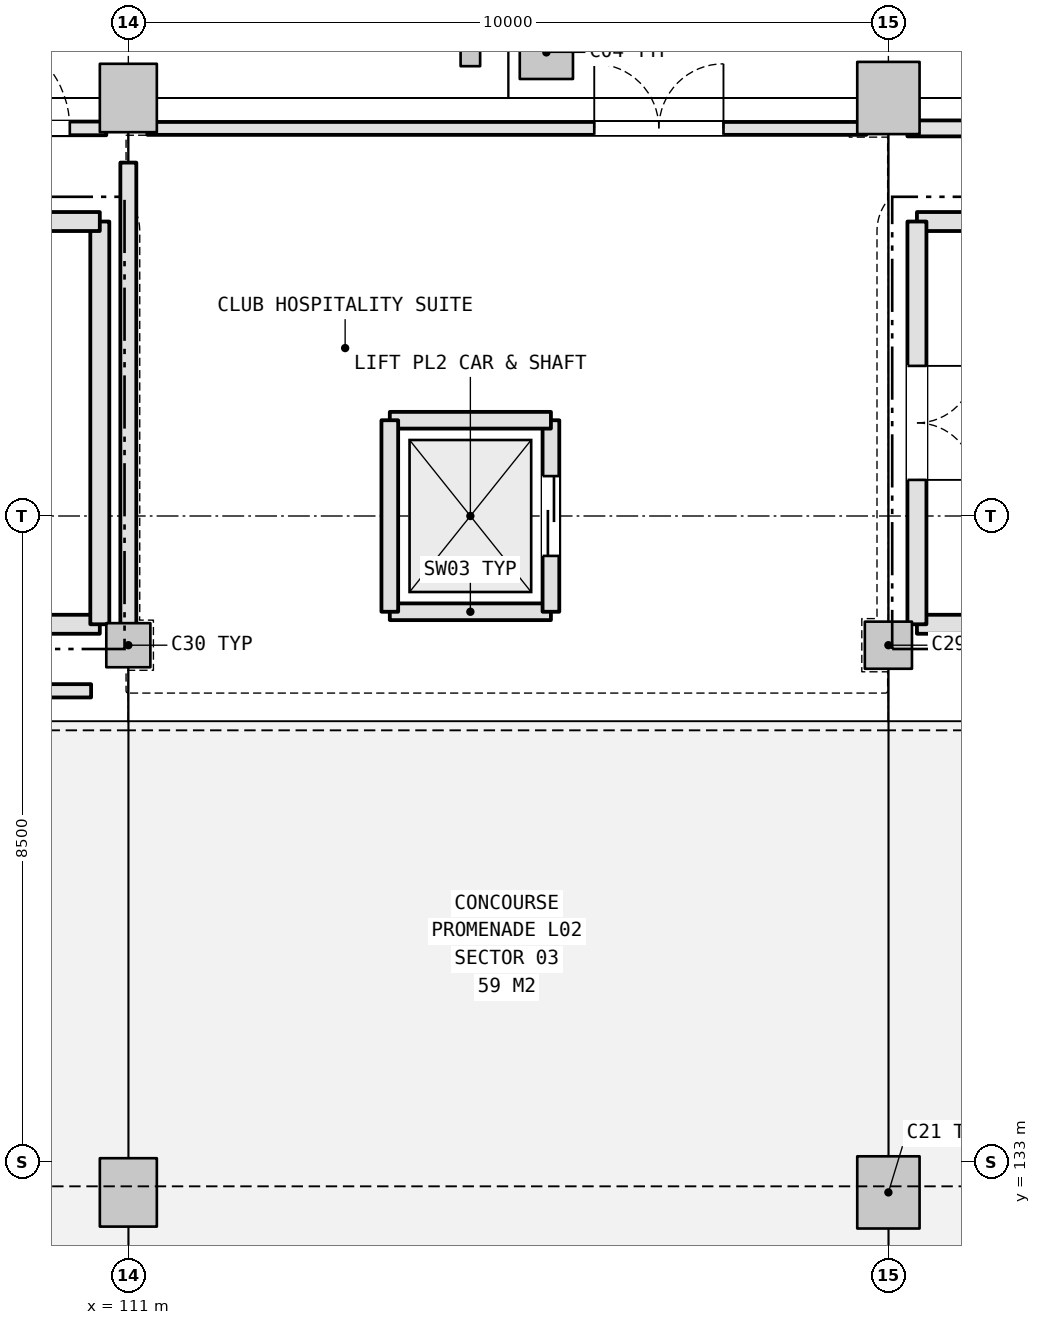
"""IFC4 building model, lengths in metres.
Left out: names, types, materials, properties, quantities, classifications, styles, units other than length and angle.
Written with IfcOpenShell. Run it as: python <this file> out.ifc"""

import sys

from ifc_helpers import new_model, si_unit, direction, frame, frame_2d, origin, origin_2d, place, context, subcontext, project, spatial, rectangle, i_section, extrude, element, fill, save


model = new_model("IFC4")
c1 = context("Model", 3, precision=1e-05, world=origin(), true_north=direction((0.0, 1.0)))
c2 = subcontext(c1, "Body", "Model", "MODEL_VIEW")
j1 = project(units=[si_unit("LENGTHUNIT", "METRE"), si_unit("PLANEANGLEUNIT", "RADIAN")], contexts=[c1])
p1 = place(None, origin())
s1 = spatial("IfcSite", under=j1, at=p1, CompositionType="ELEMENT")
p2 = place(p1, origin())
s2 = spatial("IfcBuilding", under=s1, at=p2, CompositionType="ELEMENT")
p3 = place(p2, frame((0.0, 0.0, 10.8)))
s3 = spatial("IfcBuildingStorey", under=s2, at=p3, CompositionType="ELEMENT", Elevation=10.8)
p4 = place(p3, frame((121.0, 132.6, 0.0), z_axis=(0.0, 0.0, 1.0), x_axis=(1.0, 0.0, 0.0)))
e1 = element("IfcColumn", 1, at=p4, inside=s3, PredefinedType="COLUMN", context=c2, shape_type="SweptSolid", body=[
    extrude(rectangle(XDim=0.82, YDim=0.95, at=origin_2d()), origin(), (0.0, 0.0, 1.0), 5.4),
])
p5 = place(p3, frame((121.0, 139.8, 0.0), z_axis=(0.0, 0.0, 1.0), x_axis=(1.0, 0.0, 0.0)))
e2 = element("IfcColumn", 2, at=p5, inside=s3, PredefinedType="COLUMN", context=c2, shape_type="SweptSolid", body=[
    extrude(rectangle(XDim=0.62, YDim=0.62, at=origin_2d()), origin(), (0.0, 0.0, 1.0), 5.4),
])
p6 = place(p3, frame((121.0, 147.0, 0.0), z_axis=(0.0, 0.0, 1.0), x_axis=(1.0, 0.0, 0.0)))
e3 = element("IfcColumn", 3, at=p6, inside=s3, PredefinedType="COLUMN", context=c2, shape_type="SweptSolid", body=[
    extrude(rectangle(XDim=0.82, YDim=0.95, at=origin_2d()), origin(), (0.0, 0.0, 1.0), 5.4),
])
p7 = place(p3, frame((111.0, 132.6, 0.0), z_axis=(0.0, 0.0, 1.0), x_axis=(1.0, 0.0, 0.0)))
e4 = element("IfcColumn", 4, at=p7, inside=s3, PredefinedType="COLUMN", context=c2, shape_type="SweptSolid", body=[
    extrude(rectangle(XDim=0.75, YDim=0.9, at=origin_2d()), origin(), (0.0, 0.0, 1.0), 5.4),
])
p8 = place(p3, frame((111.0, 139.8, 0.0), z_axis=(0.0, 0.0, 1.0), x_axis=(1.0, 0.0, 0.0)))
e5 = element("IfcColumn", 5, at=p8, inside=s3, PredefinedType="COLUMN", context=c2, shape_type="SweptSolid", body=[
    extrude(rectangle(XDim=0.58, YDim=0.58, at=origin_2d()), origin(), (0.0, 0.0, 1.0), 5.4),
])
p9 = place(p3, frame((111.0, 147.0, 0.0), z_axis=(0.0, 0.0, 1.0), x_axis=(1.0, 0.0, 0.0)))
e6 = element("IfcColumn", 6, at=p9, inside=s3, PredefinedType="COLUMN", context=c2, shape_type="SweptSolid", body=[
    extrude(rectangle(XDim=0.75, YDim=0.9, at=origin_2d()), origin(), (0.0, 0.0, 1.0), 5.4),
])
p10 = place(p3, frame((116.5, 147.6, 0.0), z_axis=(0.0, 0.0, 1.0), x_axis=(1.0, 0.0, 0.0)))
e7 = element("IfcColumn", 7, at=p10, inside=s3, PredefinedType="COLUMN", context=c2, shape_type="SweptSolid", body=[
    extrude(rectangle(XDim=0.7, YDim=0.7, at=origin_2d()), origin(), (0.0, 0.0, 1.0), 5.4),
])
p11 = place(p3, frame((115.5, 147.6, 0.0), z_axis=(0.0, 0.0, 1.0), x_axis=(1.0, 0.0, 0.0)))
e8 = element("IfcColumn", 8, at=p11, inside=s3, PredefinedType="COLUMN", context=c2, shape_type="SweptSolid", body=[
    extrude(i_section(OverallWidth=0.257, OverallDepth=0.363, WebThickness=0.013, FlangeThickness=0.022, FilletRadius=0.015, at=origin_2d()), origin(), (0.0, 0.0, 1.0), 5.4),
])
for number, where, z_axis, x_axis in (
    (9, (121.375, 140.075, 0.0), (0.0, 0.0, 1.0), (1.0, 0.0, 0.0)),
    (10, (130.625, 145.375, 0.0), (0.0, 0.0, 1.0), (-1.0, 0.0, 0.0)),
):
    element("IfcWall", number, at=place(p3, frame(where, z_axis=z_axis, x_axis=x_axis)), inside=s3, PredefinedType="SHEAR", context=c2, shape_type="SweptSolid", body=[
        extrude(rectangle(XDim=9.249, YDim=0.25, at=frame_2d((4.625, 0.0))), origin(), (0.0, 0.0, 1.0), 5.15),
    ])
p12 = place(p3, frame((121.375, 145.375, 0.0), z_axis=(0.0, 0.0, 1.0), x_axis=(0.0, -1.0, 0.0)))
e11 = element("IfcWall", 11, at=p12, inside=s3, PredefinedType="SHEAR", context=c2, shape_type="SweptSolid", body=[
    extrude(rectangle(XDim=5.299, YDim=0.25, at=frame_2d((2.649, 0.0))), origin(), (0.0, 0.0, 1.0), 5.15),
])
p13 = place(p12, frame((1.9, 0.0, 0.0)))
e12 = element("IfcOpeningElement", 12, at=p13, cuts=e11, PredefinedType="OPENING", context=c2, shape_type="SweptSolid", body=[
    extrude(rectangle(XDim=1.5, YDim=2.2, at=frame_2d((0.75, 1.1))), frame((0.0, 0.135, 0.0), z_axis=(0.0, -1.0, 0.0), x_axis=(1.0, 0.0, 0.0)), (0.0, 0.0, 1.0), 0.27),
])
p14 = place(p3, frame((101.375, 140.075, 0.0), z_axis=(0.0, 0.0, 1.0), x_axis=(1.0, 0.0, 0.0)))
e13 = element("IfcWall", 13, at=p14, inside=s3, PredefinedType="SHEAR", context=c2, shape_type="SweptSolid", body=[
    extrude(rectangle(XDim=9.249, YDim=0.25, at=frame_2d((4.625, 0.0))), origin(), (0.0, 0.0, 1.0), 5.15),
])
p15 = place(p3, frame((110.625, 140.075, 0.0), z_axis=(0.0, 0.0, 1.0), x_axis=(0.0, 1.0, 0.0)))
e14 = element("IfcWall", 14, at=p15, inside=s3, PredefinedType="SHEAR", context=c2, shape_type="SweptSolid", body=[
    extrude(rectangle(XDim=5.299, YDim=0.25, at=frame_2d((2.649, 0.0))), origin(), (0.0, 0.0, 1.0), 5.15),
])
p16 = place(p3, frame((110.625, 145.375, 0.0), z_axis=(0.0, 0.0, 1.0), x_axis=(-1.0, 0.0, 0.0)))
e15 = element("IfcWall", 15, at=p16, inside=s3, PredefinedType="SHEAR", context=c2, shape_type="SweptSolid", body=[
    extrude(rectangle(XDim=9.249, YDim=0.25, at=frame_2d((4.625, 0.0))), origin(), (0.0, 0.0, 1.0), 5.15),
])
p17 = place(p3, frame((114.44, 140.24, 0.0), z_axis=(0.0, 0.0, 1.0), x_axis=(1.0, 0.0, 0.0)))
e16 = element("IfcWall", 16, at=p17, inside=s3, PredefinedType="SHEAR", context=c2, shape_type="SweptSolid", body=[
    extrude(rectangle(XDim=2.12, YDim=0.22, at=frame_2d((1.06, 0.0))), origin(), (0.0, 0.0, 1.0), 5.15),
])
p18 = place(p3, frame((116.56, 140.24, 0.0), z_axis=(0.0, 0.0, 1.0), x_axis=(0.0, 1.0, 0.0)))
e17 = element("IfcWall", 17, at=p18, inside=s3, PredefinedType="SHEAR", context=c2, shape_type="SweptSolid", body=[
    extrude(rectangle(XDim=2.52, YDim=0.22, at=frame_2d((1.26, 0.0))), origin(), (0.0, 0.0, 1.0), 5.15),
])
p19 = place(p18, frame((0.735, 0.0, 0.0)))
e18 = element("IfcOpeningElement", 18, at=p19, cuts=e17, PredefinedType="OPENING", context=c2, shape_type="SweptSolid", body=[
    extrude(rectangle(XDim=1.05, YDim=2.15, at=frame_2d((0.525, 1.075))), frame((0.0, 0.12, 0.0), z_axis=(0.0, -1.0, 0.0), x_axis=(1.0, 0.0, 0.0)), (0.0, 0.0, 1.0), 0.24),
])
p20 = place(p3, frame((116.56, 142.76, 0.0), z_axis=(0.0, 0.0, 1.0), x_axis=(-1.0, 0.0, 0.0)))
e19 = element("IfcWall", 19, at=p20, inside=s3, PredefinedType="SHEAR", context=c2, shape_type="SweptSolid", body=[
    extrude(rectangle(XDim=2.12, YDim=0.22, at=frame_2d((1.06, 0.0))), origin(), (0.0, 0.0, 1.0), 5.15),
])
p21 = place(p3, frame((114.44, 142.76, 0.0), z_axis=(0.0, 0.0, 1.0), x_axis=(0.0, -1.0, 0.0)))
e20 = element("IfcWall", 20, at=p21, inside=s3, PredefinedType="SHEAR", context=c2, shape_type="SweptSolid", body=[
    extrude(rectangle(XDim=2.52, YDim=0.22, at=frame_2d((1.26, 0.0))), origin(), (0.0, 0.0, 1.0), 5.15),
])
p22 = place(p3, frame((121.25, 146.6, 0.0), z_axis=(0.0, 0.0, 1.0), x_axis=(1.0, 0.0, 0.0)))
e21 = element("IfcWall", 21, at=p22, inside=s3, PredefinedType="PLUMBINGWALL", context=c2, shape_type="SweptSolid", body=[
    extrude(rectangle(XDim=9.46, YDim=0.21, at=frame_2d((4.73, 0.0))), origin(), (0.0, 0.0, 1.0), 4.255),
])
p23 = place(p22, frame((7.48, 0.0, 0.0)))
e22 = element("IfcOpeningElement", 22, at=p23, cuts=e21, PredefinedType="OPENING", context=c2, shape_type="SweptSolid", body=[
    extrude(rectangle(XDim=0.9, YDim=2.1, at=frame_2d((0.45, 1.05))), frame((0.0, 0.115, 0.0), z_axis=(0.0, -1.0, 0.0), x_axis=(1.0, 0.0, 0.0)), (0.0, 0.0, 1.0), 0.23),
])
p24 = place(p3, frame((111.25, 146.6, 0.0), z_axis=(0.0, 0.0, 1.0), x_axis=(1.0, 0.0, 0.0)))
e23 = element("IfcWall", 23, at=p24, inside=s3, PredefinedType="PARTITIONING", context=c2, shape_type="SweptSolid", body=[
    extrude(rectangle(XDim=9.46, YDim=0.17, at=frame_2d((4.73, 0.0))), origin(), (0.0, 0.0, 1.0), 4.215),
])
p25 = place(p24, frame((5.88, 0.0, 0.0)))
e24 = element("IfcOpeningElement", 24, at=p25, cuts=e23, PredefinedType="OPENING", context=c2, shape_type="SweptSolid", body=[
    extrude(rectangle(XDim=1.7, YDim=2.25, at=frame_2d((0.85, 1.125))), frame((0.0, 0.095, 0.0), z_axis=(0.0, -1.0, 0.0), x_axis=(1.0, 0.0, 0.0)), (0.0, 0.0, 1.0), 0.19),
])
p26 = place(p3, frame((111.0, 139.65, 0.0), z_axis=(0.0, 0.0, 1.0), x_axis=(0.0, 1.0, 0.0)))
e25 = element("IfcWall", 25, at=p26, inside=s3, PredefinedType="PLUMBINGWALL", context=c2, shape_type="SweptSolid", body=[
    extrude(rectangle(XDim=6.5, YDim=0.21, at=frame_2d((3.25, 0.0))), origin(), (0.0, 0.0, 1.0), 4.215),
])
p27 = place(p3, frame((101.25, 146.6, 0.0), z_axis=(0.0, 0.0, 1.0), x_axis=(1.0, 0.0, 0.0)))
e26 = element("IfcWall", 26, at=p27, inside=s3, PredefinedType="PARTITIONING", context=c2, shape_type="SweptSolid", body=[
    extrude(rectangle(XDim=9.46, YDim=0.18, at=frame_2d((4.73, 0.0))), origin(), (0.0, 0.0, 1.0), 4.215),
])
p28 = place(p27, frame((7.68, 0.0, 0.0)))
e27 = element("IfcOpeningElement", 27, at=p28, cuts=e26, PredefinedType="OPENING", context=c2, shape_type="SweptSolid", body=[
    extrude(rectangle(XDim=1.3, YDim=2.2, at=frame_2d((0.65, 1.1))), frame((0.0, 0.1, 0.0), z_axis=(0.0, -1.0, 0.0), x_axis=(1.0, 0.0, 0.0)), (0.0, 0.0, 1.0), 0.2),
])
p29 = place(p3, frame((110.51, 139.2, 0.0), z_axis=(0.0, 0.0, 1.0), x_axis=(-1.0, 0.0, 0.0)))
e28 = element("IfcWall", 28, at=p29, inside=s3, PredefinedType="PARTITIONING", context=c2, shape_type="SweptSolid", body=[
    extrude(rectangle(XDim=9.06, YDim=0.175, at=frame_2d((4.53, 0.0))), origin(), (0.0, 0.0, 1.0), 5.12),
])
p30 = place(p13, origin())
e29 = element("IfcDoor", 29, at=p30, inside=s3, OperationType="DOUBLE_DOOR_SINGLE_SWING", PredefinedType="DOOR", context=c2, shape_type="SweptSolid", body=[
    extrude(rectangle(XDim=1.5, YDim=2.2, at=frame_2d((0.75, 1.1))), frame((0.0, 0.025, 0.0), z_axis=(0.0, -1.0, 0.0), x_axis=(1.0, 0.0, 0.0)), (0.0, 0.0, 1.0), 0.05),
])
fill(e12, e29)
p31 = place(p19, origin())
e30 = element("IfcDoor", 30, at=p31, inside=s3, OperationType="DOUBLE_DOOR_SLIDING", PredefinedType="DOOR", context=c2, shape_type="SweptSolid", body=[
    extrude(rectangle(XDim=1.05, YDim=2.15, at=frame_2d((0.525, 1.075))), frame((0.0, 0.025, 0.0), z_axis=(0.0, -1.0, 0.0), x_axis=(1.0, 0.0, 0.0)), (0.0, 0.0, 1.0), 0.05),
])
fill(e18, e30)
p32 = place(p25, origin())
e31 = element("IfcDoor", 31, at=p32, inside=s3, OperationType="DOUBLE_DOOR_SINGLE_SWING", PredefinedType="DOOR", context=c2, shape_type="SweptSolid", body=[
    extrude(rectangle(XDim=1.7, YDim=2.25, at=frame_2d((0.85, 1.125))), frame((0.0, 0.025, 0.0), z_axis=(0.0, -1.0, 0.0), x_axis=(1.0, 0.0, 0.0)), (0.0, 0.0, 1.0), 0.05),
])
fill(e24, e31)
p33 = place(p28, origin())
e32 = element("IfcDoor", 32, at=p33, inside=s3, OperationType="SINGLE_SWING_LEFT", PredefinedType="DOOR", context=c2, shape_type="SweptSolid", body=[
    extrude(rectangle(XDim=1.3, YDim=2.2, at=frame_2d((0.65, 1.1))), frame((0.0, 0.025, 0.0), z_axis=(0.0, -1.0, 0.0), x_axis=(1.0, 0.0, 0.0)), (0.0, 0.0, 1.0), 0.05),
])
fill(e27, e32)
save(model, sys.argv[1])
